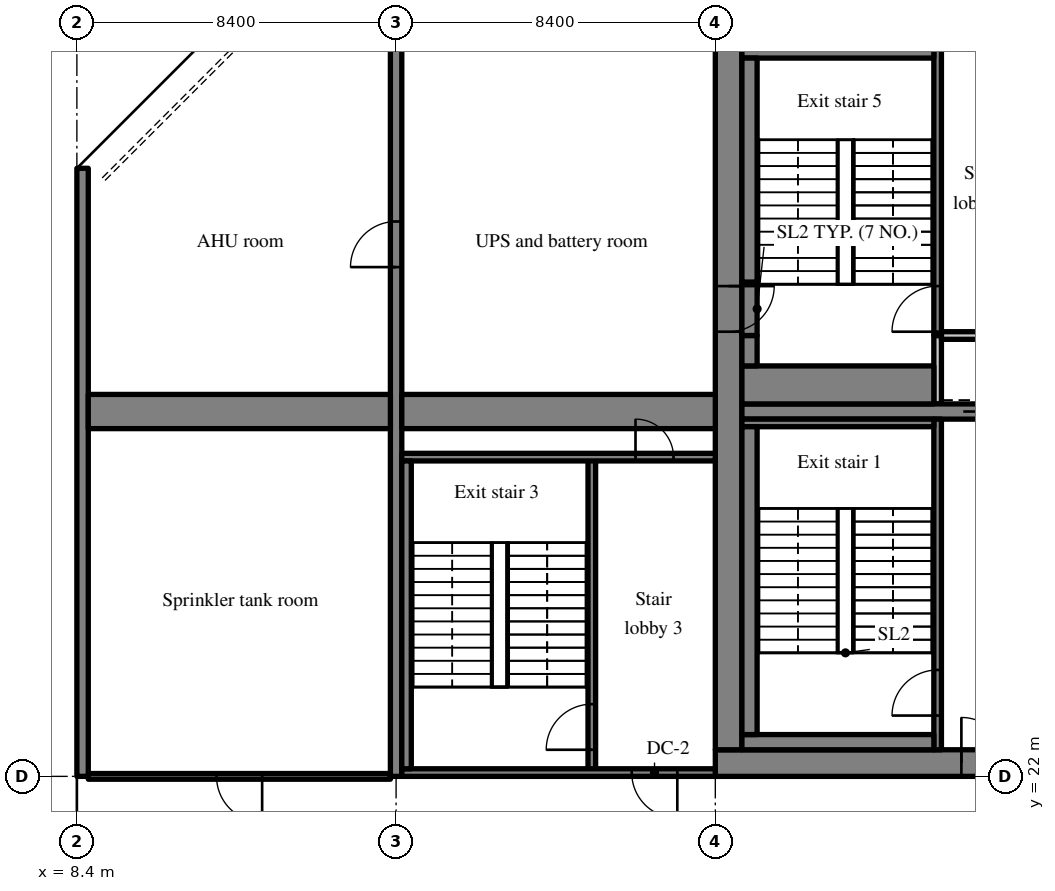
"""IFC4 building model, lengths in metres.
Left out: names, types, materials, properties, quantities, classifications, styles, units other than length and angle.
Written with IfcOpenShell. Run it as: python <this file> out.ifc"""

import sys

from ifc_helpers import new_model, si_unit, direction, frame, frame_2d, origin, place, context, subcontext, project, spatial, rectangle, extrude, source, transform, mapped, element, fill, save


model = new_model("IFC4")
c1 = context("Model", 3, precision=1e-05, world=origin(), true_north=direction((0.0, 1.0)))
c2 = subcontext(c1, "Body", "Model", "MODEL_VIEW")
j1 = project(units=[si_unit("LENGTHUNIT", "METRE"), si_unit("PLANEANGLEUNIT", "RADIAN")], contexts=[c1])
p1 = place(None, origin())
s1 = spatial("IfcSite", under=j1, at=p1, CompositionType="ELEMENT")
p2 = place(p1, origin())
s2 = spatial("IfcBuilding", under=s1, at=p2, CompositionType="ELEMENT")
p3 = place(p2, frame((0.0, 0.0, 201.0)))
s3 = spatial("IfcBuildingStorey", under=s2, at=p3, CompositionType="ELEMENT", Elevation=201.0)
m1 = source(origin(), c2, "Body", "SweptSolid", [
    extrude(rectangle(XDim=50.4, YDim=0.7, at=frame_2d((25.2, 0.0))), origin(), (0.0, 0.0, 1.0), 5.12),
])
p4 = place(p3, frame((25.2, 22.35, 0.0), z_axis=(0.0, 0.0, 1.0), x_axis=(1.0, 0.0, 0.0)))
e1 = element("IfcWall", 1, at=p4, inside=s3, PredefinedType="SHEAR", context=c2, shape_type="MappedRepresentation", body=[
    mapped(m1, transform((0.0, 0.0, 0.0), scale=1.0)),
])
m2 = source(origin(), c2, "Body", "SweptSolid", [
    extrude(rectangle(XDim=1.2, YDim=2.1, at=frame_2d((0.6, 1.05))), frame((0.0, 0.36, 0.0), z_axis=(0.0, -1.0, 0.0), x_axis=(1.0, 0.0, 0.0)), (0.0, 0.0, 1.0), 0.72),
])
p5 = place(p4, frame((22.25, 0.0, 0.0)))
e2 = element("IfcOpeningElement", 2, at=p5, cuts=e1, PredefinedType="OPENING", context=c2, shape_type="MappedRepresentation", body=[
    mapped(m2, transform((0.0, 0.0, 0.0), scale=1.0)),
])
m3 = source(origin(), c2, "Body", "SweptSolid", [
    extrude(rectangle(XDim=0.9, YDim=2.1, at=frame_2d((0.45, 1.05))), frame((0.0, 0.36, 0.0), z_axis=(0.0, -1.0, 0.0), x_axis=(1.0, 0.0, 0.0)), (0.0, 0.0, 1.0), 0.72),
])
p6 = place(p4, frame((15.75, 0.0, 0.0)))
e3 = element("IfcOpeningElement", 3, at=p6, cuts=e1, PredefinedType="OPENING", context=c2, shape_type="MappedRepresentation", body=[
    mapped(m3, transform((0.0, 0.0, 0.0), scale=1.0)),
])
p7 = place(p4, frame((18.75, 0.0, 0.0)))
e4 = element("IfcOpeningElement", 4, at=p7, cuts=e1, PredefinedType="OPENING", context=c2, shape_type="MappedRepresentation", body=[
    mapped(m3, transform((0.0, 0.0, 0.0), scale=1.0)),
])
p8 = place(p4, frame((11.2, 0.0, 0.0)))
e5 = element("IfcOpeningElement", 5, at=p8, cuts=e1, PredefinedType="OPENING", context=c2, shape_type="MappedRepresentation", body=[
    mapped(m3, transform((0.0, 0.0, 0.0), scale=1.0)),
])
m4 = source(origin(), c2, "Body", "SweptSolid", [
    extrude(rectangle(XDim=1.8, YDim=2.1, at=frame_2d((0.9, 1.05))), frame((0.0, 0.36, 0.0), z_axis=(0.0, -1.0, 0.0), x_axis=(1.0, 0.0, 0.0)), (0.0, 0.0, 1.0), 0.72),
])
p9 = place(p4, frame((32.7, 0.0, 0.0)))
e6 = element("IfcOpeningElement", 6, at=p9, cuts=e1, PredefinedType="OPENING", context=c2, shape_type="MappedRepresentation", body=[
    mapped(m4, transform((0.0, 0.0, 0.0), scale=1.0)),
])
p10 = place(p4, frame((6.475, 0.0, 0.0)))
e7 = element("IfcOpeningElement", 7, at=p10, cuts=e1, PredefinedType="OPENING", context=c2, shape_type="MappedRepresentation", body=[
    mapped(m2, transform((0.0, 0.0, 0.0), scale=1.0)),
])
p11 = place(p4, frame((47.875, 0.0, 0.0)))
e8 = element("IfcOpeningElement", 8, at=p11, cuts=e1, PredefinedType="OPENING", context=c2, shape_type="MappedRepresentation", body=[
    mapped(m2, transform((0.0, 0.0, 0.0), scale=1.0)),
])
m5 = source(origin(), c2, "Body", "SweptSolid", [
    extrude(rectangle(XDim=18.6, YDim=0.7, at=frame_2d((9.3, 0.0))), origin(), (0.0, 0.0, 1.0), 5.12),
])
p12 = place(p3, frame((25.55, 22.7, 0.0), z_axis=(0.0, 0.0, 1.0), x_axis=(0.0, 1.0, 0.0)))
e9 = element("IfcWall", 9, at=p12, inside=s3, PredefinedType="SHEAR", context=c2, shape_type="MappedRepresentation", body=[
    mapped(m5, transform((0.0, 0.0, 0.0), scale=1.0)),
])
p13 = place(p12, frame((11.0, 0.0, 0.0)))
e10 = element("IfcOpeningElement", 10, at=p13, cuts=e9, PredefinedType="OPENING", context=c2, shape_type="MappedRepresentation", body=[
    mapped(m2, transform((0.0, 0.0, 0.0), scale=1.0)),
])
m6 = source(origin(), c2, "Body", "SweptSolid", [
    extrude(rectangle(XDim=7.5, YDim=0.4, at=frame_2d((3.75, 0.0))), origin(), (0.0, 0.0, 1.0), 5.12),
])
p14 = place(p3, frame((25.9, 31.6, 0.0), z_axis=(0.0, 0.0, 1.0), x_axis=(1.0, 0.0, 0.0)))
e11 = element("IfcWall", 11, at=p14, inside=s3, PredefinedType="SHEAR", context=c2, shape_type="MappedRepresentation", body=[
    mapped(m6, transform((0.0, 0.0, 0.0), scale=1.0)),
])
m7 = source(origin(), c2, "Body", "SweptSolid", [
    extrude(rectangle(XDim=1.1, YDim=2.1, at=frame_2d((0.55, 1.05))), frame((0.0, 0.21, 0.0), z_axis=(0.0, -1.0, 0.0), x_axis=(1.0, 0.0, 0.0)), (0.0, 0.0, 1.0), 0.42),
])
p15 = place(p14, frame((5.825, 0.0, 0.0)))
e12 = element("IfcOpeningElement", 12, at=p15, cuts=e11, PredefinedType="OPENING", context=c2, shape_type="MappedRepresentation", body=[
    mapped(m7, transform((0.0, 0.0, 0.0), scale=1.0)),
])
m8 = source(origin(), c2, "Body", "SweptSolid", [
    extrude(rectangle(XDim=16.0, YDim=0.3, at=frame_2d((8.0, 0.0))), origin(), (0.0, 0.0, 1.0), 5.12),
])
p16 = place(p3, frame((8.55, 22.0, 0.0), z_axis=(0.0, 0.0, 1.0), x_axis=(0.0, 1.0, 0.0)))
e13 = element("IfcWall", 13, at=p16, inside=s3, PredefinedType="SHEAR", context=c2, shape_type="MappedRepresentation", body=[
    mapped(m8, transform((0.0, 0.0, 0.0), scale=1.0)),
])
m9 = source(origin(), c2, "Body", "SweptSolid", [
    extrude(rectangle(XDim=20.0, YDim=0.3, at=frame_2d((10.0, 0.0))), origin(), (0.0, 0.0, 1.0), 5.12),
])
p17 = place(p3, frame((16.8, 22.0, 0.0), z_axis=(0.0, 0.0, 1.0), x_axis=(0.0, 1.0, 0.0)))
e14 = element("IfcWall", 14, at=p17, inside=s3, PredefinedType="SHEAR", context=c2, shape_type="MappedRepresentation", body=[
    mapped(m9, transform((0.0, 0.0, 0.0), scale=1.0)),
])
m10 = source(origin(), c2, "Body", "SweptSolid", [
    extrude(rectangle(XDim=1.2, YDim=2.1, at=frame_2d((0.6, 1.05))), frame((0.0, 0.16, 0.0), z_axis=(0.0, -1.0, 0.0), x_axis=(1.0, 0.0, 0.0)), (0.0, 0.0, 1.0), 0.32),
])
p18 = place(p17, frame((13.4, 0.0, 0.0)))
e15 = element("IfcOpeningElement", 15, at=p18, cuts=e14, PredefinedType="OPENING", context=c2, shape_type="MappedRepresentation", body=[
    mapped(m10, transform((0.0, 0.0, 0.0), scale=1.0)),
])
m11 = source(origin(), c2, "Body", "SweptSolid", [
    extrude(rectangle(XDim=7.95, YDim=0.9, at=frame_2d((3.975, 0.0))), origin(), (0.0, 0.0, 1.0), 5.12),
])
p19 = place(p3, frame((8.7, 31.6, 0.0), z_axis=(0.0, 0.0, 1.0), x_axis=(1.0, 0.0, 0.0)))
e16 = element("IfcWall", 16, at=p19, inside=s3, PredefinedType="SHEAR", context=c2, shape_type="MappedRepresentation", body=[
    mapped(m11, transform((0.0, 0.0, 0.0), scale=1.0)),
])
m12 = source(origin(), c2, "Body", "SweptSolid", [
    extrude(rectangle(XDim=8.25, YDim=0.9, at=frame_2d((4.125, 0.0))), origin(), (0.0, 0.0, 1.0), 5.12),
])
p20 = place(p3, frame((16.95, 31.6, 0.0), z_axis=(0.0, 0.0, 1.0), x_axis=(1.0, 0.0, 0.0)))
e17 = element("IfcWall", 17, at=p20, inside=s3, PredefinedType="SHEAR", context=c2, shape_type="MappedRepresentation", body=[
    mapped(m12, transform((0.0, 0.0, 0.0), scale=1.0)),
])
m13 = source(origin(), c2, "Body", "SweptSolid", [
    extrude(rectangle(XDim=8.7, YDim=0.2, at=frame_2d((4.35, 0.0))), origin(), (0.0, 0.0, 1.0), 5.12),
])
p21 = place(p3, frame((31.05, 22.7, 0.0), z_axis=(0.0, 0.0, 1.0), x_axis=(0.0, 1.0, 0.0)))
e18 = element("IfcWall", 18, at=p21, inside=s3, PredefinedType="SOLIDWALL", context=c2, shape_type="MappedRepresentation", body=[
    mapped(m13, transform((0.0, 0.0, 0.0), scale=1.0)),
])
m14 = source(origin(), c2, "Body", "SweptSolid", [
    extrude(rectangle(XDim=1.2, YDim=2.1, at=frame_2d((0.6, 1.05))), frame((0.0, 0.11, 0.0), z_axis=(0.0, -1.0, 0.0), x_axis=(1.0, 0.0, 0.0)), (0.0, 0.0, 1.0), 0.22),
])
p22 = place(p21, frame((0.9, 0.0, 0.0)))
e19 = element("IfcOpeningElement", 19, at=p22, cuts=e18, PredefinedType="OPENING", context=c2, shape_type="MappedRepresentation", body=[
    mapped(m14, transform((0.0, 0.0, 0.0), scale=1.0)),
])
m15 = source(origin(), c2, "Body", "SweptSolid", [
    extrude(rectangle(XDim=1.8, YDim=0.2, at=frame_2d((0.9, 0.0))), origin(), (0.0, 0.0, 1.0), 5.12),
])
p23 = place(p3, frame((31.05, 31.8, 0.0), z_axis=(0.0, 0.0, 1.0), x_axis=(0.0, 1.0, 0.0)))
e20 = element("IfcWall", 20, at=p23, inside=s3, PredefinedType="SOLIDWALL", context=c2, shape_type="MappedRepresentation", body=[
    mapped(m15, transform((0.0, 0.0, 0.0), scale=1.0)),
])
m16 = source(origin(), c2, "Body", "SweptSolid", [
    extrude(rectangle(XDim=2.25, YDim=0.2, at=frame_2d((1.125, 0.0))), origin(), (0.0, 0.0, 1.0), 5.12),
])
p24 = place(p3, frame((31.15, 33.6, 0.0), z_axis=(0.0, 0.0, 1.0), x_axis=(1.0, 0.0, 0.0)))
e21 = element("IfcWall", 21, at=p24, inside=s3, PredefinedType="SOLIDWALL", context=c2, shape_type="MappedRepresentation", body=[
    mapped(m16, transform((0.0, 0.0, 0.0), scale=1.0)),
])
m17 = source(origin(), c2, "Body", "SweptSolid", [
    extrude(rectangle(XDim=7.7, YDim=0.2, at=frame_2d((3.85, 0.0))), origin(), (0.0, 0.0, 1.0), 5.12),
])
p25 = place(p3, frame((31.05, 33.6, 0.0), z_axis=(0.0, 0.0, 1.0), x_axis=(0.0, 1.0, 0.0)))
e22 = element("IfcWall", 22, at=p25, inside=s3, PredefinedType="SOLIDWALL", context=c2, shape_type="MappedRepresentation", body=[
    mapped(m17, transform((0.0, 0.0, 0.0), scale=1.0)),
])
p26 = place(p25, frame((0.1, 0.0, 0.0)))
e23 = element("IfcOpeningElement", 23, at=p26, cuts=e22, PredefinedType="OPENING", context=c2, shape_type="MappedRepresentation", body=[
    mapped(m14, transform((0.0, 0.0, 0.0), scale=1.0)),
])
m18 = source(origin(), c2, "Body", "SweptSolid", [
    extrude(rectangle(XDim=8.3, YDim=0.2, at=frame_2d((4.15, 0.0))), origin(), (0.0, 0.0, 1.0), 5.12),
])
p27 = place(p3, frame((21.95, 22.1, 0.0), z_axis=(0.0, 0.0, 1.0), x_axis=(0.0, 1.0, 0.0)))
e24 = element("IfcWall", 24, at=p27, inside=s3, PredefinedType="SOLIDWALL", context=c2, shape_type="MappedRepresentation", body=[
    mapped(m18, transform((0.0, 0.0, 0.0), scale=1.0)),
])
p28 = place(p27, frame((0.6, 0.0, 0.0)))
e25 = element("IfcOpeningElement", 25, at=p28, cuts=e24, PredefinedType="OPENING", context=c2, shape_type="MappedRepresentation", body=[
    mapped(m14, transform((0.0, 0.0, 0.0), scale=1.0)),
])
m19 = source(origin(), c2, "Body", "SweptSolid", [
    extrude(rectangle(XDim=8.25, YDim=0.2, at=frame_2d((4.125, 0.0))), origin(), (0.0, 0.0, 1.0), 5.12),
])
p29 = place(p3, frame((16.95, 22.1, 0.0), z_axis=(0.0, 0.0, 1.0), x_axis=(1.0, 0.0, 0.0)))
e26 = element("IfcWall", 26, at=p29, inside=s3, PredefinedType="SOLIDWALL", context=c2, shape_type="MappedRepresentation", body=[
    mapped(m19, transform((0.0, 0.0, 0.0), scale=1.0)),
])
p30 = place(p29, frame((6.05, 0.0, 0.0)))
e27 = element("IfcOpeningElement", 27, at=p30, cuts=e26, PredefinedType="OPENING", context=c2, shape_type="MappedRepresentation", body=[
    mapped(m14, transform((0.0, 0.0, 0.0), scale=1.0)),
])
p31 = place(p3, frame((25.2, 30.4, 0.0), z_axis=(0.0, 0.0, 1.0), x_axis=(-1.0, 0.0, 0.0)))
e28 = element("IfcWall", 28, at=p31, inside=s3, PredefinedType="SOLIDWALL", context=c2, shape_type="MappedRepresentation", body=[
    mapped(m19, transform((0.0, 0.0, 0.0), scale=1.0)),
])
m20 = source(origin(), c2, "Body", "SweptSolid", [
    extrude(rectangle(XDim=1.0, YDim=2.1, at=frame_2d((0.5, 1.05))), frame((0.0, 0.11, 0.0), z_axis=(0.0, -1.0, 0.0), x_axis=(1.0, 0.0, 0.0)), (0.0, 0.0, 1.0), 0.22),
])
p32 = place(p31, frame((1.1, 0.0, 0.0)))
e29 = element("IfcOpeningElement", 29, at=p32, cuts=e28, PredefinedType="OPENING", context=c2, shape_type="MappedRepresentation", body=[
    mapped(m20, transform((0.0, 0.0, 0.0), scale=1.0)),
])
m21 = source(origin(), c2, "Body", "SweptSolid", [
    extrude(rectangle(XDim=5.05, YDim=0.4, at=frame_2d((2.525, 0.0))), origin(), (0.0, 0.0, 1.0), 5.12),
])
p33 = place(p3, frame((25.9, 22.9, 0.0), z_axis=(0.0, 0.0, 1.0), x_axis=(1.0, 0.0, 0.0)))
e30 = element("IfcWall", 30, at=p33, inside=s3, PredefinedType="SOLIDWALL", context=c2, shape_type="MappedRepresentation", body=[
    mapped(m21, transform((0.0, 0.0, 0.0), scale=1.0)),
])
m22 = source(origin(), c2, "Body", "SweptSolid", [
    extrude(rectangle(XDim=5.05, YDim=0.2, at=frame_2d((2.525, 0.0))), origin(), (0.0, 0.0, 1.0), 5.12),
])
p34 = place(p3, frame((25.9, 31.3, 0.0), z_axis=(0.0, 0.0, 1.0), x_axis=(1.0, 0.0, 0.0)))
e31 = element("IfcWall", 31, at=p34, inside=s3, PredefinedType="SOLIDWALL", context=c2, shape_type="MappedRepresentation", body=[
    mapped(m22, transform((0.0, 0.0, 0.0), scale=1.0)),
])
m23 = source(origin(), c2, "Body", "SweptSolid", [
    extrude(rectangle(XDim=8.1, YDim=0.4, at=frame_2d((4.05, 0.0))), origin(), (0.0, 0.0, 1.0), 5.12),
])
p35 = place(p3, frame((26.1, 23.1, 0.0), z_axis=(0.0, 0.0, 1.0), x_axis=(0.0, 1.0, 0.0)))
e32 = element("IfcWall", 32, at=p35, inside=s3, PredefinedType="SOLIDWALL", context=c2, shape_type="MappedRepresentation", body=[
    mapped(m23, transform((0.0, 0.0, 0.0), scale=1.0)),
])
m24 = source(origin(), c2, "Body", "SweptSolid", [
    extrude(rectangle(XDim=8.1, YDim=0.25, at=frame_2d((4.05, 0.0))), origin(), (0.0, 0.0, 1.0), 5.12),
])
p36 = place(p3, frame((17.075, 22.2, 0.0), z_axis=(0.0, 0.0, 1.0), x_axis=(0.0, 1.0, 0.0)))
e33 = element("IfcWall", 33, at=p36, inside=s3, PredefinedType="SOLIDWALL", context=c2, shape_type="MappedRepresentation", body=[
    mapped(m24, transform((0.0, 0.0, 0.0), scale=1.0)),
])
p37 = place(p3, frame((25.9, 41.1, 0.0), z_axis=(0.0, 0.0, 1.0), x_axis=(1.0, 0.0, 0.0)))
e34 = element("IfcWall", 34, at=p37, inside=s3, PredefinedType="SOLIDWALL", context=c2, shape_type="MappedRepresentation", body=[
    mapped(m21, transform((0.0, 0.0, 0.0), scale=1.0)),
])
m25 = source(origin(), c2, "Body", "SweptSolid", [
    extrude(rectangle(XDim=5.05, YDim=1.0, at=frame_2d((2.525, 0.0))), origin(), (0.0, 0.0, 1.0), 5.12),
])
p38 = place(p3, frame((25.9, 32.3, 0.0), z_axis=(0.0, 0.0, 1.0), x_axis=(1.0, 0.0, 0.0)))
e35 = element("IfcWall", 35, at=p38, inside=s3, PredefinedType="SOLIDWALL", context=c2, shape_type="MappedRepresentation", body=[
    mapped(m25, transform((0.0, 0.0, 0.0), scale=1.0)),
])
m26 = source(origin(), c2, "Body", "SweptSolid", [
    extrude(rectangle(XDim=0.8, YDim=0.4, at=frame_2d((0.4, 0.0))), origin(), (0.0, 0.0, 1.0), 5.12),
])
p39 = place(p3, frame((26.1, 32.8, 0.0), z_axis=(0.0, 0.0, 1.0), x_axis=(0.0, 1.0, 0.0)))
e36 = element("IfcWall", 36, at=p39, inside=s3, PredefinedType="SOLIDWALL", context=c2, shape_type="MappedRepresentation", body=[
    mapped(m26, transform((0.0, 0.0, 0.0), scale=1.0)),
])
m27 = source(origin(), c2, "Body", "SweptSolid", [
    extrude(rectangle(XDim=5.9, YDim=0.4, at=frame_2d((2.95, 0.0))), origin(), (0.0, 0.0, 1.0), 5.12),
])
p40 = place(p3, frame((26.1, 35.0, 0.0), z_axis=(0.0, 0.0, 1.0), x_axis=(0.0, 1.0, 0.0)))
e37 = element("IfcWall", 37, at=p40, inside=s3, PredefinedType="SOLIDWALL", context=c2, shape_type="MappedRepresentation", body=[
    mapped(m27, transform((0.0, 0.0, 0.0), scale=1.0)),
])
m28 = source(origin(), c2, "Body", "SweptSolid", [
    extrude(rectangle(XDim=1.4, YDim=0.4, at=frame_2d((0.7, 0.0))), origin(), (0.0, 0.0, 1.0), 2.12),
])
p41 = place(p3, frame((26.1, 33.6, 3.0), z_axis=(0.0, 0.0, 1.0), x_axis=(0.0, 1.0, 0.0)))
e38 = element("IfcWall", 38, at=p41, inside=s3, PredefinedType="SOLIDWALL", context=c2, shape_type="MappedRepresentation", body=[
    mapped(m28, transform((0.0, 0.0, 0.0), scale=1.0)),
])
m29 = source(origin(), c2, "Body", "SweptSolid", [
    extrude(rectangle(XDim=7.95, YDim=0.15, at=frame_2d((3.975, 0.0))), origin(), (0.0, 0.0, 1.0), 4.37),
])
p42 = place(p3, frame((8.7, 22.0, 0.0), z_axis=(0.0, 0.0, 1.0), x_axis=(1.0, 0.0, 0.0)))
e39 = element("IfcWall", 39, at=p42, inside=s3, PredefinedType="PARTITIONING", context=c2, shape_type="MappedRepresentation", body=[
    mapped(m29, transform((0.0, 0.0, 0.0), scale=1.0)),
])
m30 = source(origin(), c2, "Body", "SweptSolid", [
    extrude(rectangle(XDim=1.2, YDim=2.1, at=frame_2d((0.6, 1.05))), frame((0.0, 0.085, 0.0), z_axis=(0.0, -1.0, 0.0), x_axis=(1.0, 0.0, 0.0)), (0.0, 0.0, 1.0), 0.17),
])
p43 = place(p42, frame((3.375, 0.0, 0.0)))
e40 = element("IfcOpeningElement", 40, at=p43, cuts=e39, PredefinedType="OPENING", context=c2, shape_type="MappedRepresentation", body=[
    mapped(m30, transform((0.0, 0.0, 0.0), scale=1.0)),
])
m31 = source(origin(), c2, "Body", "SweptSolid", [
    extrude(rectangle(XDim=1.2, YDim=2.1, at=frame_2d((0.6, 1.05))), frame((0.0, 0.025, 0.0), z_axis=(0.0, -1.0, 0.0), x_axis=(1.0, 0.0, 0.0)), (0.0, 0.0, 1.0), 0.05),
])
p44 = place(p22, origin())
e41 = element("IfcDoor", 41, at=p44, inside=s3, OperationType="SINGLE_SWING_LEFT", PredefinedType="DOOR", context=c2, shape_type="MappedRepresentation", body=[
    mapped(m31, transform((0.0, 0.0, 0.0), scale=1.0)),
])
fill(e19, e41)
m32 = source(origin(), c2, "Body", "SweptSolid", [
    extrude(rectangle(XDim=1.2, YDim=2.1, at=frame_2d((0.6, 1.05))), frame((0.0, 0.275, 0.0), z_axis=(0.0, -1.0, 0.0), x_axis=(1.0, 0.0, 0.0)), (0.0, 0.0, 1.0), 0.05),
])
p45 = place(p10, origin())
e42 = element("IfcDoor", 42, at=p45, inside=s3, OperationType="SINGLE_SWING_LEFT", PredefinedType="DOOR", context=c2, shape_type="MappedRepresentation", body=[
    mapped(m32, transform((0.0, 0.0, 0.0), scale=1.0)),
])
fill(e7, e42)
m33 = source(origin(), c2, "Body", "SweptSolid", [
    extrude(rectangle(XDim=1.1, YDim=2.1, at=frame_2d((0.55, 1.05))), frame((0.0, 0.025, 0.0), z_axis=(0.0, -1.0, 0.0), x_axis=(1.0, 0.0, 0.0)), (0.0, 0.0, 1.0), 0.05),
])
p46 = place(p15, origin())
e43 = element("IfcDoor", 43, at=p46, inside=s3, OperationType="SLIDING_TO_LEFT", PredefinedType="DOOR", context=c2, shape_type="MappedRepresentation", body=[
    mapped(m33, transform((0.0, 0.0, 0.0), scale=1.0)),
])
fill(e12, e43)
p47 = place(p26, origin())
e44 = element("IfcDoor", 44, at=p47, inside=s3, OperationType="SINGLE_SWING_LEFT", PredefinedType="DOOR", context=c2, shape_type="MappedRepresentation", body=[
    mapped(m31, transform((0.0, 0.0, 0.0), scale=1.0)),
])
fill(e23, e44)
p48 = place(p28, origin())
e45 = element("IfcDoor", 45, at=p48, inside=s3, OperationType="SINGLE_SWING_LEFT", PredefinedType="DOOR", context=c2, shape_type="MappedRepresentation", body=[
    mapped(m31, transform((0.0, 0.0, 0.0), scale=1.0)),
])
fill(e25, e45)
p49 = place(p30, origin())
e46 = element("IfcDoor", 46, at=p49, inside=s3, OperationType="SINGLE_SWING_RIGHT", PredefinedType="DOOR", context=c2, shape_type="MappedRepresentation", body=[
    mapped(m31, transform((0.0, 0.0, 0.0), scale=1.0)),
])
fill(e27, e46)
m34 = source(origin(), c2, "Body", "SweptSolid", [
    extrude(rectangle(XDim=1.0, YDim=2.1, at=frame_2d((0.5, 1.05))), frame((0.0, 0.025, 0.0), z_axis=(0.0, -1.0, 0.0), x_axis=(1.0, 0.0, 0.0)), (0.0, 0.0, 1.0), 0.05),
])
p50 = place(p32, origin())
e47 = element("IfcDoor", 47, at=p50, inside=s3, OperationType="SINGLE_SWING_RIGHT", PredefinedType="DOOR", context=c2, shape_type="MappedRepresentation", body=[
    mapped(m34, transform((0.0, 0.0, 0.0), scale=1.0)),
])
fill(e29, e47)
p51 = place(p43, origin())
e48 = element("IfcDoor", 48, at=p51, inside=s3, OperationType="SINGLE_SWING_RIGHT", PredefinedType="DOOR", context=c2, shape_type="MappedRepresentation", body=[
    mapped(m31, transform((0.0, 0.0, 0.0), scale=1.0)),
])
fill(e40, e48)
p52 = place(p13, origin())
e49 = element("IfcDoor", 49, at=p52, inside=s3, OperationType="SINGLE_SWING_RIGHT", PredefinedType="DOOR", context=c2, shape_type="MappedRepresentation", body=[
    mapped(m31, transform((0.0, 0.0, 0.0), scale=1.0)),
])
fill(e10, e49)
p53 = place(p18, origin())
e50 = element("IfcDoor", 50, at=p53, inside=s3, OperationType="SINGLE_SWING_LEFT", PredefinedType="DOOR", context=c2, shape_type="MappedRepresentation", body=[
    mapped(m31, transform((0.0, 0.0, 0.0), scale=1.0)),
])
fill(e15, e50)
save(model, sys.argv[1])
